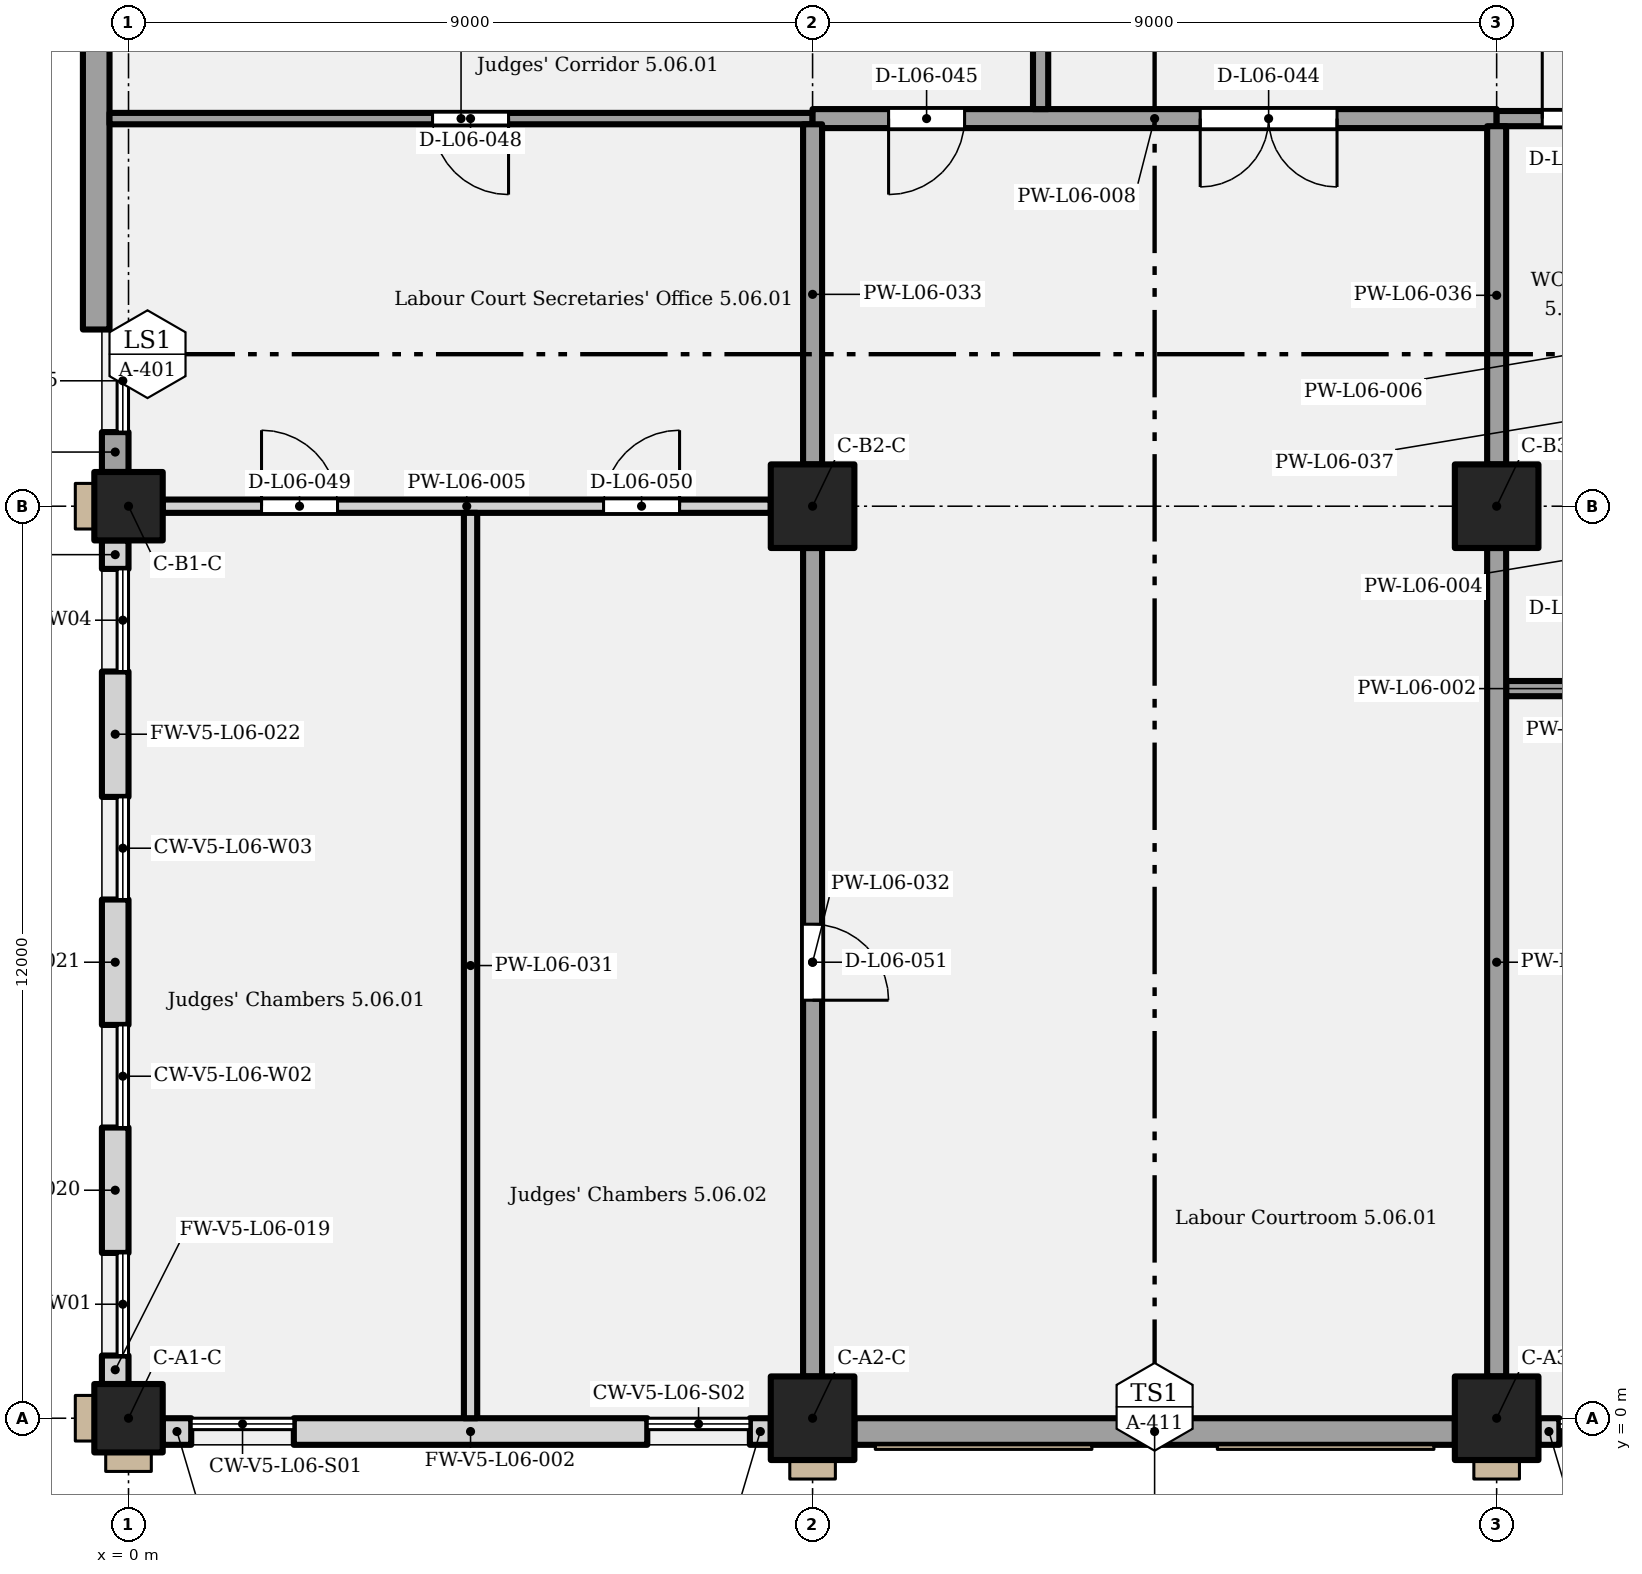
"""IFC4 building model, lengths in metres.
Left out: names, types, materials, properties, quantities, classifications, styles, units other than length and angle.
Written with IfcOpenShell. Run it as: python <this file> out.ifc"""

import sys

from ifc_helpers import new_model, si_unit, direction, frame, frame_2d, origin, origin_with_axes, origin_2d, place, context, subcontext, project, spatial, rectangle, extrude, element, fill, save


model = new_model("IFC4")
c1 = context("Model", 3, precision=1e-05, world=origin(), true_north=direction((0.0, 1.0)))
c2 = subcontext(c1, "Body", "Model", "MODEL_VIEW")
j1 = project(units=[si_unit("LENGTHUNIT", "METRE"), si_unit("PLANEANGLEUNIT", "RADIAN")], contexts=[c1])
p1 = place(None, origin())
s1 = spatial("IfcSite", under=j1, at=p1, CompositionType="ELEMENT")
p2 = place(p1, origin())
s2 = spatial("IfcBuilding", under=s1, at=p2, CompositionType="ELEMENT")
p3 = place(p2, frame((0.0, 0.0, 33.6)))
s3 = spatial("IfcBuildingStorey", under=s2, at=p3, CompositionType="ELEMENT", Elevation=33.6)
p4 = place(p3, origin_with_axes())
e1 = element("IfcColumn", 1, at=p4, inside=s3, PredefinedType="COLUMN", context=c2, shape_type="SweptSolid", body=[
    extrude(rectangle(XDim=0.9, YDim=0.9, at=origin_2d()), origin(), (0.0, 0.0, 1.0), 5.4),
])
for number, where, z_axis, x_axis in (
    (2, (9.0, 0.0, 0.0), (0.0, 0.0, 1.0), (1.0, 0.0, 0.0)),
    (3, (18.0, 0.0, 0.0), (0.0, 0.0, 1.0), (1.0, 0.0, 0.0)),
):
    element("IfcColumn", number, at=place(p3, frame(where, z_axis=z_axis, x_axis=x_axis)), inside=s3, PredefinedType="COLUMN", context=c2, shape_type="SweptSolid", body=[
        extrude(rectangle(XDim=1.1, YDim=1.1, at=origin_2d()), origin(), (0.0, 0.0, 1.0), 5.4),
    ])
p5 = place(p3, frame((0.0, 12.0, 0.0), z_axis=(0.0, 0.0, 1.0), x_axis=(1.0, 0.0, 0.0)))
e4 = element("IfcColumn", 4, at=p5, inside=s3, PredefinedType="COLUMN", context=c2, shape_type="SweptSolid", body=[
    extrude(rectangle(XDim=0.9, YDim=0.9, at=origin_2d()), origin(), (0.0, 0.0, 1.0), 5.4),
])
for number, where, z_axis, x_axis in (
    (5, (9.0, 12.0, 0.0), (0.0, 0.0, 1.0), (1.0, 0.0, 0.0)),
    (6, (18.0, 12.0, 0.0), (0.0, 0.0, 1.0), (1.0, 0.0, 0.0)),
):
    element("IfcColumn", number, at=place(p3, frame(where, z_axis=z_axis, x_axis=x_axis)), inside=s3, PredefinedType="COLUMN", context=c2, shape_type="SweptSolid", body=[
        extrude(rectangle(XDim=1.1, YDim=1.1, at=origin_2d()), origin(), (0.0, 0.0, 1.0), 5.4),
    ])
p6 = place(p3, frame((0.45, -0.175, 0.0), z_axis=(0.0, 0.0, 1.0), x_axis=(1.0, 0.0, 0.0)))
e7 = element("IfcWall", 7, at=p6, inside=s3, PredefinedType="SOLIDWALL", context=c2, shape_type="SweptSolid", body=[
    extrude(rectangle(XDim=0.375, YDim=0.35, at=frame_2d((0.188, 0.0))), origin(), (0.0, 0.0, 1.0), 5.15),
])
p7 = place(p3, frame((2.175, -0.175, 0.0), z_axis=(0.0, 0.0, 1.0), x_axis=(1.0, 0.0, 0.0)))
e8 = element("IfcWall", 8, at=p7, inside=s3, PredefinedType="SOLIDWALL", context=c2, shape_type="SweptSolid", body=[
    extrude(rectangle(XDim=4.65, YDim=0.35, at=frame_2d((2.325, 0.0))), origin(), (0.0, 0.0, 1.0), 5.15),
])
p8 = place(p3, frame((8.175, -0.175, 0.0), z_axis=(0.0, 0.0, 1.0), x_axis=(1.0, 0.0, 0.0)))
e9 = element("IfcWall", 9, at=p8, inside=s3, PredefinedType="SOLIDWALL", context=c2, shape_type="SweptSolid", body=[
    extrude(rectangle(XDim=0.275, YDim=0.35, at=frame_2d((0.137, 0.0))), origin(), (0.0, 0.0, 1.0), 5.15),
])
p9 = place(p3, frame((9.55, -0.175, 0.0), z_axis=(0.0, 0.0, 1.0), x_axis=(1.0, 0.0, 0.0)))
e10 = element("IfcWall", 10, at=p9, inside=s3, PredefinedType="SOLIDWALL", context=c2, shape_type="SweptSolid", body=[
    extrude(rectangle(XDim=7.9, YDim=0.35, at=frame_2d((3.95, 0.0))), origin(), (0.0, 0.0, 1.0), 5.15),
])
p10 = place(p3, frame((18.55, -0.175, 0.0), z_axis=(0.0, 0.0, 1.0), x_axis=(1.0, 0.0, 0.0)))
e11 = element("IfcWall", 11, at=p10, inside=s3, PredefinedType="SOLIDWALL", context=c2, shape_type="SweptSolid", body=[
    extrude(rectangle(XDim=0.275, YDim=0.35, at=frame_2d((0.137, 0.0))), origin(), (0.0, 0.0, 1.0), 5.15),
])
p11 = place(p3, frame((-0.175, 0.45, 0.0), z_axis=(0.0, 0.0, 1.0), x_axis=(0.0, 1.0, 0.0)))
e12 = element("IfcWall", 12, at=p11, inside=s3, PredefinedType="SOLIDWALL", context=c2, shape_type="SweptSolid", body=[
    extrude(rectangle(XDim=0.375, YDim=0.35, at=frame_2d((0.188, 0.0))), origin(), (0.0, 0.0, 1.0), 5.15),
])
for number, where, z_axis, x_axis in (
    (13, (-0.175, 2.175, 0.0), (0.0, 0.0, 1.0), (0.0, 1.0, 0.0)),
    (14, (-0.175, 5.175, 0.0), (0.0, 0.0, 1.0), (0.0, 1.0, 0.0)),
    (15, (-0.175, 8.175, 0.0), (0.0, 0.0, 1.0), (0.0, 1.0, 0.0)),
):
    element("IfcWall", number, at=place(p3, frame(where, z_axis=z_axis, x_axis=x_axis)), inside=s3, PredefinedType="SOLIDWALL", context=c2, shape_type="SweptSolid", body=[
        extrude(rectangle(XDim=1.65, YDim=0.35, at=frame_2d((0.825, 0.0))), origin(), (0.0, 0.0, 1.0), 5.15),
    ])
p12 = place(p3, frame((-0.175, 11.175, 0.0), z_axis=(0.0, 0.0, 1.0), x_axis=(0.0, 1.0, 0.0)))
e16 = element("IfcWall", 16, at=p12, inside=s3, PredefinedType="SOLIDWALL", context=c2, shape_type="SweptSolid", body=[
    extrude(rectangle(XDim=0.375, YDim=0.35, at=frame_2d((0.188, 0.0))), origin(), (0.0, 0.0, 1.0), 5.15),
])
p13 = place(p3, frame((-0.175, 12.45, 0.0), z_axis=(0.0, 0.0, 1.0), x_axis=(0.0, 1.0, 0.0)))
e17 = element("IfcWall", 17, at=p13, inside=s3, PredefinedType="SOLIDWALL", context=c2, shape_type="SweptSolid", body=[
    extrude(rectangle(XDim=0.525, YDim=0.35, at=frame_2d((0.263, 0.0))), origin(), (0.0, 0.0, 1.0), 5.15),
])
p14 = place(p3, frame((-0.425, 14.325, 0.0), z_axis=(0.0, 0.0, 1.0), x_axis=(0.0, 1.0, 0.0)))
e18 = element("IfcWall", 18, at=p14, inside=s3, PredefinedType="SOLIDWALL", context=c2, shape_type="SweptSolid", body=[
    extrude(rectangle(XDim=13.725, YDim=0.35, at=frame_2d((6.863, 0.0))), origin(), (0.0, 0.0, 1.0), 5.15),
])
p15 = place(p3, frame((18.125, 9.6, 0.0), z_axis=(0.0, 0.0, 1.0), x_axis=(1.0, 0.0, 0.0)))
e19 = element("IfcWall", 19, at=p15, inside=s3, PredefinedType="PARTITIONING", context=c2, shape_type="SweptSolid", body=[
    extrude(rectangle(XDim=2.075, YDim=0.2, at=frame_2d((1.038, 0.0))), origin(), (0.0, 0.0, 1.0), 5.15),
])
p16 = place(p3, frame((0.45, 12.0, 0.0), z_axis=(0.0, 0.0, 1.0), x_axis=(1.0, 0.0, 0.0)))
e20 = element("IfcWall", 20, at=p16, inside=s3, PredefinedType="PARTITIONING", context=c2, shape_type="SweptSolid", body=[
    extrude(rectangle(XDim=8.0, YDim=0.175, at=frame_2d((4.0, 0.0))), origin(), (0.0, 0.0, 1.0), 4.4),
])
p17 = place(p16, frame((1.3, 0.0, 0.0)))
e21 = element("IfcOpeningElement", 21, at=p17, cuts=e20, PredefinedType="OPENING", context=c2, shape_type="SweptSolid", body=[
    extrude(rectangle(XDim=1.0, YDim=2.1, at=frame_2d((0.5, 1.05))), frame((0.0, 0.097, 0.0), z_axis=(0.0, -1.0, 0.0), x_axis=(1.0, 0.0, 0.0)), (0.0, 0.0, 1.0), 0.195),
])
p18 = place(p16, frame((5.8, 0.0, 0.0)))
e22 = element("IfcOpeningElement", 22, at=p18, cuts=e20, PredefinedType="OPENING", context=c2, shape_type="SweptSolid", body=[
    extrude(rectangle(XDim=1.0, YDim=2.1, at=frame_2d((0.5, 1.05))), frame((0.0, 0.097, 0.0), z_axis=(0.0, -1.0, 0.0), x_axis=(1.0, 0.0, 0.0)), (0.0, 0.0, 1.0), 0.195),
])
p19 = place(p3, frame((-0.25, 17.1, 0.0), z_axis=(0.0, 0.0, 1.0), x_axis=(1.0, 0.0, 0.0)))
e23 = element("IfcWall", 23, at=p19, inside=s3, PredefinedType="PARTITIONING", context=c2, shape_type="SweptSolid", body=[
    extrude(rectangle(XDim=9.25, YDim=0.15, at=frame_2d((4.625, 0.0))), origin(), (0.0, 0.0, 1.0), 5.15),
])
p20 = place(p19, frame((5.25, 0.0, 0.0), z_axis=(0.0, 0.0, 1.0), x_axis=(-1.0, 0.0, 0.0)))
e24 = element("IfcOpeningElement", 24, at=p20, cuts=e23, PredefinedType="OPENING", context=c2, shape_type="SweptSolid", body=[
    extrude(rectangle(XDim=1.0, YDim=2.1, at=frame_2d((0.5, 1.05))), frame((0.0, 0.085, 0.0), z_axis=(0.0, -1.0, 0.0), x_axis=(1.0, 0.0, 0.0)), (0.0, 0.0, 1.0), 0.17),
])
p21 = place(p3, frame((9.0, 17.1, 0.0), z_axis=(0.0, 0.0, 1.0), x_axis=(1.0, 0.0, 0.0)))
e25 = element("IfcWall", 25, at=p21, inside=s3, PredefinedType="PARTITIONING", context=c2, shape_type="SweptSolid", body=[
    extrude(rectangle(XDim=9.0, YDim=0.25, at=frame_2d((4.5, 0.0))), origin(), (0.0, 0.0, 1.0), 5.15),
])
p22 = place(p21, frame((6.9, 0.0, 0.0), z_axis=(0.0, 0.0, 1.0), x_axis=(-1.0, 0.0, 0.0)))
e26 = element("IfcOpeningElement", 26, at=p22, cuts=e25, PredefinedType="OPENING", context=c2, shape_type="SweptSolid", body=[
    extrude(rectangle(XDim=1.8, YDim=2.4, at=frame_2d((0.9, 1.2))), frame((0.0, 0.135, 0.0), z_axis=(0.0, -1.0, 0.0), x_axis=(1.0, 0.0, 0.0)), (0.0, 0.0, 1.0), 0.27),
])
p23 = place(p21, frame((2.0, 0.0, 0.0), z_axis=(0.0, 0.0, 1.0), x_axis=(-1.0, 0.0, 0.0)))
e27 = element("IfcOpeningElement", 27, at=p23, cuts=e25, PredefinedType="OPENING", context=c2, shape_type="SweptSolid", body=[
    extrude(rectangle(XDim=1.0, YDim=2.1, at=frame_2d((0.5, 1.05))), frame((0.0, 0.135, 0.0), z_axis=(0.0, -1.0, 0.0), x_axis=(1.0, 0.0, 0.0)), (0.0, 0.0, 1.0), 0.27),
])
p24 = place(p3, frame((18.0, 17.1, 0.0), z_axis=(0.0, 0.0, 1.0), x_axis=(1.0, 0.0, 0.0)))
e28 = element("IfcWall", 28, at=p24, inside=s3, PredefinedType="PARTITIONING", context=c2, shape_type="SweptSolid", body=[
    extrude(rectangle(XDim=9.25, YDim=0.2, at=frame_2d((4.625, 0.0))), origin(), (0.0, 0.0, 1.0), 5.15),
])
p25 = place(p24, frame((7.25, 0.0, 0.0), z_axis=(0.0, 0.0, 1.0), x_axis=(-1.0, 0.0, 0.0)))
e29 = element("IfcOpeningElement", 29, at=p25, cuts=e28, PredefinedType="OPENING", context=c2, shape_type="SweptSolid", body=[
    extrude(rectangle(XDim=1.0, YDim=2.1, at=frame_2d((0.5, 1.05))), frame((0.0, 0.11, 0.0), z_axis=(0.0, -1.0, 0.0), x_axis=(1.0, 0.0, 0.0)), (0.0, 0.0, 1.0), 0.22),
])
p26 = place(p24, frame((0.6, 0.0, 0.0)))
e30 = element("IfcOpeningElement", 30, at=p26, cuts=e28, PredefinedType="OPENING", context=c2, shape_type="SweptSolid", body=[
    extrude(rectangle(XDim=1.0, YDim=2.1, at=frame_2d((0.5, 1.05))), frame((0.0, 0.11, 0.0), z_axis=(0.0, -1.0, 0.0), x_axis=(1.0, 0.0, 0.0)), (0.0, 0.0, 1.0), 0.22),
])
p27 = place(p3, frame((4.5, 0.0, 0.0), z_axis=(0.0, 0.0, 1.0), x_axis=(0.0, 1.0, 0.0)))
e31 = element("IfcWall", 31, at=p27, inside=s3, PredefinedType="PARTITIONING", context=c2, shape_type="SweptSolid", body=[
    extrude(rectangle(XDim=11.913, YDim=0.175, at=frame_2d((5.956, 0.0))), origin(), (0.0, 0.0, 1.0), 5.15),
])
p28 = place(p3, frame((9.0, 0.55, 0.0), z_axis=(0.0, 0.0, 1.0), x_axis=(0.0, 1.0, 0.0)))
e32 = element("IfcWall", 32, at=p28, inside=s3, PredefinedType="PARTITIONING", context=c2, shape_type="SweptSolid", body=[
    extrude(rectangle(XDim=10.9, YDim=0.25, at=frame_2d((5.45, 0.0))), origin(), (0.0, 0.0, 1.0), 4.4),
])
p29 = place(p28, frame((5.95, 0.0, 0.0), z_axis=(0.0, 0.0, 1.0), x_axis=(-1.0, 0.0, 0.0)))
e33 = element("IfcOpeningElement", 33, at=p29, cuts=e32, PredefinedType="OPENING", context=c2, shape_type="SweptSolid", body=[
    extrude(rectangle(XDim=1.0, YDim=2.1, at=frame_2d((0.5, 1.05))), frame((0.0, 0.135, 0.0), z_axis=(0.0, -1.0, 0.0), x_axis=(1.0, 0.0, 0.0)), (0.0, 0.0, 1.0), 0.27),
])
p30 = place(p3, frame((9.0, 12.55, 0.0), z_axis=(0.0, 0.0, 1.0), x_axis=(0.0, 1.0, 0.0)))
e34 = element("IfcWall", 34, at=p30, inside=s3, PredefinedType="PARTITIONING", context=c2, shape_type="SweptSolid", body=[
    extrude(rectangle(XDim=4.475, YDim=0.25, at=frame_2d((2.237, 0.0))), origin(), (0.0, 0.0, 1.0), 4.2),
])
p31 = place(p3, frame((12.0, 17.225, 0.0), z_axis=(0.0, 0.0, 1.0), x_axis=(0.0, 1.0, 0.0)))
e35 = element("IfcWall", 35, at=p31, inside=s3, PredefinedType="PARTITIONING", context=c2, shape_type="SweptSolid", body=[
    extrude(rectangle(XDim=2.15, YDim=0.2, at=frame_2d((1.075, 0.0))), origin(), (0.0, 0.0, 1.0), 5.15),
])
p32 = place(p3, frame((18.0, 0.55, 0.0), z_axis=(0.0, 0.0, 1.0), x_axis=(0.0, 1.0, 0.0)))
e36 = element("IfcWall", 36, at=p32, inside=s3, PredefinedType="PARTITIONING", context=c2, shape_type="SweptSolid", body=[
    extrude(rectangle(XDim=10.9, YDim=0.25, at=frame_2d((5.45, 0.0))), origin(), (0.0, 0.0, 1.0), 4.4),
])
p33 = place(p3, frame((18.0, 12.55, 0.0), z_axis=(0.0, 0.0, 1.0), x_axis=(0.0, 1.0, 0.0)))
e37 = element("IfcWall", 37, at=p33, inside=s3, PredefinedType="PARTITIONING", context=c2, shape_type="SweptSolid", body=[
    extrude(rectangle(XDim=4.45, YDim=0.25, at=frame_2d((2.225, 0.0))), origin(), (0.0, 0.0, 1.0), 4.2),
])
p34 = place(p22, origin())
e38 = element("IfcDoor", 38, at=p34, inside=s3, OperationType="DOUBLE_DOOR_SINGLE_SWING", PredefinedType="DOOR", context=c2, shape_type="SweptSolid", body=[
    extrude(rectangle(XDim=1.8, YDim=2.4, at=frame_2d((0.9, 1.2))), frame((0.0, 0.025, 0.0), z_axis=(0.0, -1.0, 0.0), x_axis=(1.0, 0.0, 0.0)), (0.0, 0.0, 1.0), 0.05),
])
fill(e26, e38)
p35 = place(p23, origin())
e39 = element("IfcDoor", 39, at=p35, inside=s3, OperationType="SINGLE_SWING_RIGHT", PredefinedType="DOOR", context=c2, shape_type="SweptSolid", body=[
    extrude(rectangle(XDim=1.0, YDim=2.1, at=frame_2d((0.5, 1.05))), frame((0.0, 0.025, 0.0), z_axis=(0.0, -1.0, 0.0), x_axis=(1.0, 0.0, 0.0)), (0.0, 0.0, 1.0), 0.05),
])
fill(e27, e39)
p36 = place(p20, origin())
e40 = element("IfcDoor", 40, at=p36, inside=s3, OperationType="SINGLE_SWING_LEFT", PredefinedType="DOOR", context=c2, shape_type="SweptSolid", body=[
    extrude(rectangle(XDim=1.0, YDim=2.1, at=frame_2d((0.5, 1.05))), frame((0.0, 0.025, 0.0), z_axis=(0.0, -1.0, 0.0), x_axis=(1.0, 0.0, 0.0)), (0.0, 0.0, 1.0), 0.05),
])
fill(e24, e40)
p37 = place(p17, origin())
e41 = element("IfcDoor", 41, at=p37, inside=s3, OperationType="SINGLE_SWING_LEFT", PredefinedType="DOOR", context=c2, shape_type="SweptSolid", body=[
    extrude(rectangle(XDim=1.0, YDim=2.1, at=frame_2d((0.5, 1.05))), frame((0.0, 0.025, 0.0), z_axis=(0.0, -1.0, 0.0), x_axis=(1.0, 0.0, 0.0)), (0.0, 0.0, 1.0), 0.05),
])
fill(e21, e41)
p38 = place(p18, origin())
e42 = element("IfcDoor", 42, at=p38, inside=s3, OperationType="SINGLE_SWING_RIGHT", PredefinedType="DOOR", context=c2, shape_type="SweptSolid", body=[
    extrude(rectangle(XDim=1.0, YDim=2.1, at=frame_2d((0.5, 1.05))), frame((0.0, 0.025, 0.0), z_axis=(0.0, -1.0, 0.0), x_axis=(1.0, 0.0, 0.0)), (0.0, 0.0, 1.0), 0.05),
])
fill(e22, e42)
p39 = place(p29, origin())
e43 = element("IfcDoor", 43, at=p39, inside=s3, OperationType="SINGLE_SWING_RIGHT", PredefinedType="DOOR", context=c2, shape_type="SweptSolid", body=[
    extrude(rectangle(XDim=1.0, YDim=2.1, at=frame_2d((0.5, 1.05))), frame((0.0, 0.025, 0.0), z_axis=(0.0, -1.0, 0.0), x_axis=(1.0, 0.0, 0.0)), (0.0, 0.0, 1.0), 0.05),
])
fill(e33, e43)
p40 = place(p26, origin())
e44 = element("IfcDoor", 44, at=p40, inside=s3, OperationType="SINGLE_SWING_LEFT", PredefinedType="DOOR", context=c2, shape_type="SweptSolid", body=[
    extrude(rectangle(XDim=1.0, YDim=2.1, at=frame_2d((0.5, 1.05))), frame((0.0, 0.025, 0.0), z_axis=(0.0, -1.0, 0.0), x_axis=(1.0, 0.0, 0.0)), (0.0, 0.0, 1.0), 0.05),
])
fill(e30, e44)
save(model, sys.argv[1])
